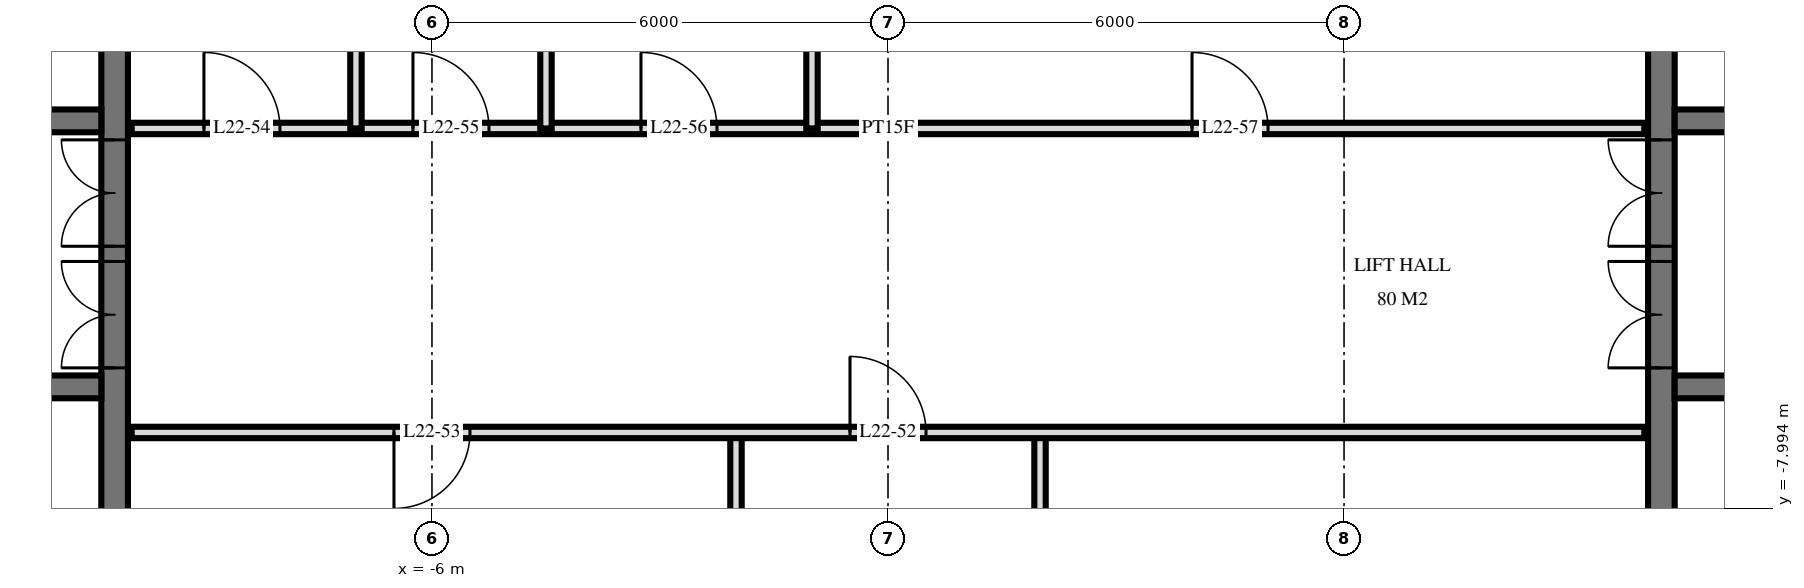
"""IFC4 building model, lengths in metres.
Left out: names, types, materials, properties, quantities, classifications, styles, units other than length and angle.
Written with IfcOpenShell. Run it as: python <this file> out.ifc"""

import sys

from ifc_helpers import new_model, si_unit, direction, frame, frame_2d, origin, place, context, subcontext, project, spatial, rectangle, extrude, element, fill, save


model = new_model("IFC4")
c1 = context("Model", 3, precision=1e-05, world=origin(), true_north=direction((0.0, 1.0)))
c2 = subcontext(c1, "Body", "Model", "MODEL_VIEW")
j1 = project(units=[si_unit("LENGTHUNIT", "METRE"), si_unit("PLANEANGLEUNIT", "RADIAN")], contexts=[c1])
p1 = place(None, origin())
s1 = spatial("IfcSite", under=j1, at=p1, CompositionType="ELEMENT")
p2 = place(p1, origin())
s2 = spatial("IfcBuilding", under=s1, at=p2, CompositionType="ELEMENT")
p3 = place(p2, frame((0.0, 0.0, 88.8)))
s3 = spatial("IfcBuildingStorey", under=s2, at=p3, CompositionType="ELEMENT", Elevation=88.8)
p4 = place(p3, frame((-10.175, -14.55, 0.0), z_axis=(0.0, 0.0, 1.0), x_axis=(0.0, 1.0, 0.0)))
e1 = element("IfcWall", 1, at=p4, inside=s3, PredefinedType="SHEAR", context=c2, shape_type="SweptSolid", body=[
    extrude(rectangle(XDim=14.1, YDim=0.35, at=frame_2d((7.05, 0.0))), origin(), (0.0, 0.0, 1.0), 3.6),
])
p5 = place(p4, frame((8.4, 0.0, 0.0)))
e2 = element("IfcOpeningElement", 2, at=p5, cuts=e1, PredefinedType="OPENING", context=c2, shape_type="SweptSolid", body=[
    extrude(rectangle(XDim=1.4, YDim=2.4, at=frame_2d((0.7, 1.2))), frame((0.0, 0.185, 0.0), z_axis=(0.0, -1.0, 0.0), x_axis=(1.0, 0.0, 0.0)), (0.0, 0.0, 1.0), 0.37),
])
p6 = place(p4, frame((10.0, 0.0, 0.0)))
e3 = element("IfcOpeningElement", 3, at=p6, cuts=e1, PredefinedType="OPENING", context=c2, shape_type="SweptSolid", body=[
    extrude(rectangle(XDim=1.4, YDim=2.4, at=frame_2d((0.7, 1.2))), frame((0.0, 0.185, 0.0), z_axis=(0.0, -1.0, 0.0), x_axis=(1.0, 0.0, 0.0)), (0.0, 0.0, 1.0), 0.37),
])
p7 = place(p4, frame((4.0, 0.0, 0.0)))
e4 = element("IfcOpeningElement", 4, at=p7, cuts=e1, PredefinedType="OPENING", context=c2, shape_type="SweptSolid", body=[
    extrude(rectangle(XDim=1.2, YDim=2.1, at=frame_2d((0.6, 1.05))), frame((0.0, 0.185, 0.0), z_axis=(0.0, -1.0, 0.0), x_axis=(1.0, 0.0, 0.0)), (0.0, 0.0, 1.0), 0.37),
])
p8 = place(p3, frame((-29.05, -2.9, 0.0), z_axis=(0.0, 0.0, 1.0), x_axis=(1.0, 0.0, 0.0)))
e5 = element("IfcWall", 5, at=p8, inside=s3, PredefinedType="SHEAR", context=c2, shape_type="SweptSolid", body=[
    extrude(rectangle(XDim=18.7, YDim=0.3, at=frame_2d((9.35, 0.0))), origin(), (0.0, 0.0, 1.0), 3.6),
])
p9 = place(p8, frame((2.95, 0.0, 0.0)))
e6 = element("IfcOpeningElement", 6, at=p9, cuts=e5, PredefinedType="OPENING", context=c2, shape_type="SweptSolid", body=[
    extrude(rectangle(XDim=1.1, YDim=2.1, at=frame_2d((0.55, 1.05))), frame((0.0, 0.16, 0.0), z_axis=(0.0, -1.0, 0.0), x_axis=(1.0, 0.0, 0.0)), (0.0, 0.0, 1.0), 0.32),
])
p10 = place(p8, frame((0.55, 0.0, 0.0)))
e7 = element("IfcOpeningElement", 7, at=p10, cuts=e5, PredefinedType="OPENING", context=c2, shape_type="SweptSolid", body=[
    extrude(rectangle(XDim=1.1, YDim=2.1, at=frame_2d((0.55, 1.05))), frame((0.0, 0.16, 0.0), z_axis=(0.0, -1.0, 0.0), x_axis=(1.0, 0.0, 0.0)), (0.0, 0.0, 1.0), 0.32),
])
p11 = place(p8, frame((10.9, 0.0, 0.0)))
e8 = element("IfcOpeningElement", 8, at=p11, cuts=e5, PredefinedType="OPENING", context=c2, shape_type="SweptSolid", body=[
    extrude(rectangle(XDim=0.9, YDim=2.1, at=frame_2d((0.45, 1.05))), frame((0.0, 0.16, 0.0), z_axis=(0.0, -1.0, 0.0), x_axis=(1.0, 0.0, 0.0)), (0.0, 0.0, 1.0), 0.32),
])
p12 = place(p8, frame((16.85, 0.0, 0.0)))
e9 = element("IfcOpeningElement", 9, at=p12, cuts=e5, PredefinedType="OPENING", context=c2, shape_type="SweptSolid", body=[
    extrude(rectangle(XDim=1.0, YDim=2.1, at=frame_2d((0.5, 1.05))), frame((0.0, 0.16, 0.0), z_axis=(0.0, -1.0, 0.0), x_axis=(1.0, 0.0, 0.0)), (0.0, 0.0, 1.0), 0.32),
])
p13 = place(p8, frame((14.312, 0.0, 0.0)))
e10 = element("IfcOpeningElement", 10, at=p13, cuts=e5, PredefinedType="OPENING", context=c2, shape_type="SweptSolid", body=[
    extrude(rectangle(XDim=1.0, YDim=2.1, at=frame_2d((0.5, 1.05))), frame((0.0, 0.16, 0.0), z_axis=(0.0, -1.0, 0.0), x_axis=(1.0, 0.0, 0.0)), (0.0, 0.0, 1.0), 0.32),
])
p14 = place(p8, frame((12.887, 0.0, 0.0)))
e11 = element("IfcOpeningElement", 11, at=p14, cuts=e5, PredefinedType="OPENING", context=c2, shape_type="SweptSolid", body=[
    extrude(rectangle(XDim=1.0, YDim=2.1, at=frame_2d((0.5, 1.05))), frame((0.0, 0.16, 0.0), z_axis=(0.0, -1.0, 0.0), x_axis=(1.0, 0.0, 0.0)), (0.0, 0.0, 1.0), 0.32),
])
p15 = place(p8, frame((5.6, 0.0, 0.0)))
e12 = element("IfcOpeningElement", 12, at=p15, cuts=e5, PredefinedType="OPENING", context=c2, shape_type="SweptSolid", body=[
    extrude(rectangle(XDim=1.0, YDim=2.1, at=frame_2d((0.5, 1.05))), frame((0.0, 0.16, 0.0), z_axis=(0.0, -1.0, 0.0), x_axis=(1.0, 0.0, 0.0)), (0.0, 0.0, 1.0), 0.32),
])
p16 = place(p3, frame((-29.05, -6.4, 0.0), z_axis=(0.0, 0.0, 1.0), x_axis=(1.0, 0.0, 0.0)))
e13 = element("IfcWall", 13, at=p16, inside=s3, PredefinedType="SHEAR", context=c2, shape_type="SweptSolid", body=[
    extrude(rectangle(XDim=18.7, YDim=0.3, at=frame_2d((9.35, 0.0))), origin(), (0.0, 0.0, 1.0), 3.6),
])
p17 = place(p16, frame((2.95, 0.0, 0.0)))
e14 = element("IfcOpeningElement", 14, at=p17, cuts=e13, PredefinedType="OPENING", context=c2, shape_type="SweptSolid", body=[
    extrude(rectangle(XDim=1.1, YDim=2.1, at=frame_2d((0.55, 1.05))), frame((0.0, 0.16, 0.0), z_axis=(0.0, -1.0, 0.0), x_axis=(1.0, 0.0, 0.0)), (0.0, 0.0, 1.0), 0.32),
])
p18 = place(p16, frame((0.55, 0.0, 0.0)))
e15 = element("IfcOpeningElement", 15, at=p18, cuts=e13, PredefinedType="OPENING", context=c2, shape_type="SweptSolid", body=[
    extrude(rectangle(XDim=1.1, YDim=2.1, at=frame_2d((0.55, 1.05))), frame((0.0, 0.16, 0.0), z_axis=(0.0, -1.0, 0.0), x_axis=(1.0, 0.0, 0.0)), (0.0, 0.0, 1.0), 0.32),
])
p19 = place(p16, frame((10.8, 0.0, 0.0)))
e16 = element("IfcOpeningElement", 16, at=p19, cuts=e13, PredefinedType="OPENING", context=c2, shape_type="SweptSolid", body=[
    extrude(rectangle(XDim=1.1, YDim=2.1, at=frame_2d((0.55, 1.05))), frame((0.0, 0.16, 0.0), z_axis=(0.0, -1.0, 0.0), x_axis=(1.0, 0.0, 0.0)), (0.0, 0.0, 1.0), 0.32),
])
p20 = place(p16, frame((5.6, 0.0, 0.0)))
e17 = element("IfcOpeningElement", 17, at=p20, cuts=e13, PredefinedType="OPENING", context=c2, shape_type="SweptSolid", body=[
    extrude(rectangle(XDim=1.0, YDim=2.1, at=frame_2d((0.5, 1.05))), frame((0.0, 0.16, 0.0), z_axis=(0.0, -1.0, 0.0), x_axis=(1.0, 0.0, 0.0)), (0.0, 0.0, 1.0), 0.32),
])
p21 = place(p3, frame((10.175, -14.55, 0.0), z_axis=(0.0, 0.0, 1.0), x_axis=(0.0, 1.0, 0.0)))
e18 = element("IfcWall", 18, at=p21, inside=s3, PredefinedType="SHEAR", context=c2, shape_type="SweptSolid", body=[
    extrude(rectangle(XDim=14.1, YDim=0.35, at=frame_2d((7.05, 0.0))), origin(), (0.0, 0.0, 1.0), 3.6),
])
p22 = place(p21, frame((8.4, 0.0, 0.0)))
e19 = element("IfcOpeningElement", 19, at=p22, cuts=e18, PredefinedType="OPENING", context=c2, shape_type="SweptSolid", body=[
    extrude(rectangle(XDim=1.4, YDim=2.4, at=frame_2d((0.7, 1.2))), frame((0.0, 0.185, 0.0), z_axis=(0.0, -1.0, 0.0), x_axis=(1.0, 0.0, 0.0)), (0.0, 0.0, 1.0), 0.37),
])
p23 = place(p21, frame((10.0, 0.0, 0.0)))
e20 = element("IfcOpeningElement", 20, at=p23, cuts=e18, PredefinedType="OPENING", context=c2, shape_type="SweptSolid", body=[
    extrude(rectangle(XDim=1.4, YDim=2.4, at=frame_2d((0.7, 1.2))), frame((0.0, 0.185, 0.0), z_axis=(0.0, -1.0, 0.0), x_axis=(1.0, 0.0, 0.0)), (0.0, 0.0, 1.0), 0.37),
])
p24 = place(p21, frame((4.0, 0.0, 0.0)))
e21 = element("IfcOpeningElement", 21, at=p24, cuts=e18, PredefinedType="OPENING", context=c2, shape_type="SweptSolid", body=[
    extrude(rectangle(XDim=1.2, YDim=2.1, at=frame_2d((0.6, 1.05))), frame((0.0, 0.185, 0.0), z_axis=(0.0, -1.0, 0.0), x_axis=(1.0, 0.0, 0.0)), (0.0, 0.0, 1.0), 0.37),
])
p25 = place(p3, frame((10.35, -2.9, 0.0), z_axis=(0.0, 0.0, 1.0), x_axis=(1.0, 0.0, 0.0)))
e22 = element("IfcWall", 22, at=p25, inside=s3, PredefinedType="SHEAR", context=c2, shape_type="SweptSolid", body=[
    extrude(rectangle(XDim=18.7, YDim=0.3, at=frame_2d((9.35, 0.0))), origin(), (0.0, 0.0, 1.0), 3.6),
])
p26 = place(p25, frame((14.65, 0.0, 0.0)))
e23 = element("IfcOpeningElement", 23, at=p26, cuts=e22, PredefinedType="OPENING", context=c2, shape_type="SweptSolid", body=[
    extrude(rectangle(XDim=1.1, YDim=2.1, at=frame_2d((0.55, 1.05))), frame((0.0, 0.16, 0.0), z_axis=(0.0, -1.0, 0.0), x_axis=(1.0, 0.0, 0.0)), (0.0, 0.0, 1.0), 0.32),
])
p27 = place(p25, frame((17.05, 0.0, 0.0)))
e24 = element("IfcOpeningElement", 24, at=p27, cuts=e22, PredefinedType="OPENING", context=c2, shape_type="SweptSolid", body=[
    extrude(rectangle(XDim=1.1, YDim=2.1, at=frame_2d((0.55, 1.05))), frame((0.0, 0.16, 0.0), z_axis=(0.0, -1.0, 0.0), x_axis=(1.0, 0.0, 0.0)), (0.0, 0.0, 1.0), 0.32),
])
p28 = place(p25, frame((6.9, 0.0, 0.0)))
e25 = element("IfcOpeningElement", 25, at=p28, cuts=e22, PredefinedType="OPENING", context=c2, shape_type="SweptSolid", body=[
    extrude(rectangle(XDim=0.9, YDim=2.1, at=frame_2d((0.45, 1.05))), frame((0.0, 0.16, 0.0), z_axis=(0.0, -1.0, 0.0), x_axis=(1.0, 0.0, 0.0)), (0.0, 0.0, 1.0), 0.32),
])
p29 = place(p25, frame((0.85, 0.0, 0.0)))
e26 = element("IfcOpeningElement", 26, at=p29, cuts=e22, PredefinedType="OPENING", context=c2, shape_type="SweptSolid", body=[
    extrude(rectangle(XDim=1.0, YDim=2.1, at=frame_2d((0.5, 1.05))), frame((0.0, 0.16, 0.0), z_axis=(0.0, -1.0, 0.0), x_axis=(1.0, 0.0, 0.0)), (0.0, 0.0, 1.0), 0.32),
])
p30 = place(p25, frame((3.387, 0.0, 0.0)))
e27 = element("IfcOpeningElement", 27, at=p30, cuts=e22, PredefinedType="OPENING", context=c2, shape_type="SweptSolid", body=[
    extrude(rectangle(XDim=1.0, YDim=2.1, at=frame_2d((0.5, 1.05))), frame((0.0, 0.16, 0.0), z_axis=(0.0, -1.0, 0.0), x_axis=(1.0, 0.0, 0.0)), (0.0, 0.0, 1.0), 0.32),
])
p31 = place(p25, frame((4.812, 0.0, 0.0)))
e28 = element("IfcOpeningElement", 28, at=p31, cuts=e22, PredefinedType="OPENING", context=c2, shape_type="SweptSolid", body=[
    extrude(rectangle(XDim=1.0, YDim=2.1, at=frame_2d((0.5, 1.05))), frame((0.0, 0.16, 0.0), z_axis=(0.0, -1.0, 0.0), x_axis=(1.0, 0.0, 0.0)), (0.0, 0.0, 1.0), 0.32),
])
p32 = place(p25, frame((12.1, 0.0, 0.0)))
e29 = element("IfcOpeningElement", 29, at=p32, cuts=e22, PredefinedType="OPENING", context=c2, shape_type="SweptSolid", body=[
    extrude(rectangle(XDim=1.0, YDim=2.1, at=frame_2d((0.5, 1.05))), frame((0.0, 0.16, 0.0), z_axis=(0.0, -1.0, 0.0), x_axis=(1.0, 0.0, 0.0)), (0.0, 0.0, 1.0), 0.32),
])
p33 = place(p3, frame((10.35, -6.4, 0.0), z_axis=(0.0, 0.0, 1.0), x_axis=(1.0, 0.0, 0.0)))
e30 = element("IfcWall", 30, at=p33, inside=s3, PredefinedType="SHEAR", context=c2, shape_type="SweptSolid", body=[
    extrude(rectangle(XDim=18.7, YDim=0.3, at=frame_2d((9.35, 0.0))), origin(), (0.0, 0.0, 1.0), 3.6),
])
p34 = place(p33, frame((14.65, 0.0, 0.0)))
e31 = element("IfcOpeningElement", 31, at=p34, cuts=e30, PredefinedType="OPENING", context=c2, shape_type="SweptSolid", body=[
    extrude(rectangle(XDim=1.1, YDim=2.1, at=frame_2d((0.55, 1.05))), frame((0.0, 0.16, 0.0), z_axis=(0.0, -1.0, 0.0), x_axis=(1.0, 0.0, 0.0)), (0.0, 0.0, 1.0), 0.32),
])
p35 = place(p33, frame((17.05, 0.0, 0.0)))
e32 = element("IfcOpeningElement", 32, at=p35, cuts=e30, PredefinedType="OPENING", context=c2, shape_type="SweptSolid", body=[
    extrude(rectangle(XDim=1.1, YDim=2.1, at=frame_2d((0.55, 1.05))), frame((0.0, 0.16, 0.0), z_axis=(0.0, -1.0, 0.0), x_axis=(1.0, 0.0, 0.0)), (0.0, 0.0, 1.0), 0.32),
])
p36 = place(p33, frame((6.8, 0.0, 0.0)))
e33 = element("IfcOpeningElement", 33, at=p36, cuts=e30, PredefinedType="OPENING", context=c2, shape_type="SweptSolid", body=[
    extrude(rectangle(XDim=1.1, YDim=2.1, at=frame_2d((0.55, 1.05))), frame((0.0, 0.16, 0.0), z_axis=(0.0, -1.0, 0.0), x_axis=(1.0, 0.0, 0.0)), (0.0, 0.0, 1.0), 0.32),
])
p37 = place(p33, frame((12.1, 0.0, 0.0)))
e34 = element("IfcOpeningElement", 34, at=p37, cuts=e30, PredefinedType="OPENING", context=c2, shape_type="SweptSolid", body=[
    extrude(rectangle(XDim=1.0, YDim=2.1, at=frame_2d((0.5, 1.05))), frame((0.0, 0.16, 0.0), z_axis=(0.0, -1.0, 0.0), x_axis=(1.0, 0.0, 0.0)), (0.0, 0.0, 1.0), 0.32),
])
p38 = place(p3, frame((2.0, -11.0, 0.0), z_axis=(0.0, 0.0, 1.0), x_axis=(0.0, 1.0, 0.0)))
e35 = element("IfcWall", 35, at=p38, inside=s3, PredefinedType="PARTITIONING", context=c2, shape_type="SweptSolid", body=[
    extrude(rectangle(XDim=4.0, YDim=0.15, at=frame_2d((2.0, 0.0))), origin(), (0.0, 0.0, 1.0), 3.32),
])
p39 = place(p3, frame((-1.0, -3.0, 0.0), z_axis=(0.0, 0.0, 1.0), x_axis=(0.0, 1.0, 0.0)))
e36 = element("IfcWall", 36, at=p39, inside=s3, PredefinedType="PARTITIONING", context=c2, shape_type="SweptSolid", body=[
    extrude(rectangle(XDim=4.02, YDim=0.15, at=frame_2d((2.01, 0.0))), origin(), (0.0, 0.0, 1.0), 3.32),
])
p40 = place(p3, frame((-2.0, -11.0, 0.0), z_axis=(0.0, 0.0, 1.0), x_axis=(0.0, 1.0, 0.0)))
e37 = element("IfcWall", 37, at=p40, inside=s3, PredefinedType="PARTITIONING", context=c2, shape_type="SweptSolid", body=[
    extrude(rectangle(XDim=4.0, YDim=0.15, at=frame_2d((2.0, 0.0))), origin(), (0.0, 0.0, 1.0), 3.32),
])
for number, where, z_axis, x_axis in (
    (38, (-4.5, -3.0, 0.0), (0.0, 0.0, 1.0), (0.0, 1.0, 0.0)),
    (39, (-7.0, -3.0, 0.0), (0.0, 0.0, 1.0), (0.0, 1.0, 0.0)),
):
    element("IfcWall", number, at=place(p3, frame(where, z_axis=z_axis, x_axis=x_axis)), inside=s3, PredefinedType="PLUMBINGWALL", context=c2, shape_type="SweptSolid", body=[
        extrude(rectangle(XDim=4.02, YDim=0.15, at=frame_2d((2.01, 0.0))), origin(), (0.0, 0.0, 1.0), 3.32),
    ])
p41 = place(p3, frame((-9.95, -7.0, 0.0), z_axis=(0.0, 0.0, 1.0), x_axis=(1.0, 0.0, 0.0)))
e40 = element("IfcWall", 40, at=p41, inside=s3, PredefinedType="PARTITIONING", context=c2, shape_type="SweptSolid", body=[
    extrude(rectangle(XDim=19.9, YDim=0.15, at=frame_2d((9.95, 0.0))), origin(), (0.0, 0.0, 1.0), 3.32),
])
p42 = place(p41, frame((9.45, 0.0, 0.0)))
e41 = element("IfcOpeningElement", 41, at=p42, cuts=e40, PredefinedType="OPENING", context=c2, shape_type="SweptSolid", body=[
    extrude(rectangle(XDim=1.0, YDim=2.1, at=frame_2d((0.5, 1.05))), frame((0.0, 0.085, 0.0), z_axis=(0.0, -1.0, 0.0), x_axis=(1.0, 0.0, 0.0)), (0.0, 0.0, 1.0), 0.17),
])
p43 = place(p41, frame((3.45, 0.0, 0.0)))
e42 = element("IfcOpeningElement", 42, at=p43, cuts=e40, PredefinedType="OPENING", context=c2, shape_type="SweptSolid", body=[
    extrude(rectangle(XDim=1.0, YDim=2.1, at=frame_2d((0.5, 1.05))), frame((0.0, 0.085, 0.0), z_axis=(0.0, -1.0, 0.0), x_axis=(1.0, 0.0, 0.0)), (0.0, 0.0, 1.0), 0.17),
])
p44 = place(p3, frame((-9.95, -3.0, 0.0), z_axis=(0.0, 0.0, 1.0), x_axis=(1.0, 0.0, 0.0)))
e43 = element("IfcWall", 43, at=p44, inside=s3, PredefinedType="PARTITIONING", context=c2, shape_type="SweptSolid", body=[
    extrude(rectangle(XDim=19.9, YDim=0.15, at=frame_2d((9.95, 0.0))), origin(), (0.0, 0.0, 1.0), 3.32),
])
p45 = place(p44, frame((0.95, 0.0, 0.0)))
e44 = element("IfcOpeningElement", 44, at=p45, cuts=e43, PredefinedType="OPENING", context=c2, shape_type="SweptSolid", body=[
    extrude(rectangle(XDim=1.0, YDim=2.1, at=frame_2d((0.5, 1.05))), frame((0.0, 0.085, 0.0), z_axis=(0.0, -1.0, 0.0), x_axis=(1.0, 0.0, 0.0)), (0.0, 0.0, 1.0), 0.17),
])
p46 = place(p44, frame((3.7, 0.0, 0.0)))
e45 = element("IfcOpeningElement", 45, at=p46, cuts=e43, PredefinedType="OPENING", context=c2, shape_type="SweptSolid", body=[
    extrude(rectangle(XDim=1.0, YDim=2.1, at=frame_2d((0.5, 1.05))), frame((0.0, 0.085, 0.0), z_axis=(0.0, -1.0, 0.0), x_axis=(1.0, 0.0, 0.0)), (0.0, 0.0, 1.0), 0.17),
])
p47 = place(p44, frame((6.7, 0.0, 0.0)))
e46 = element("IfcOpeningElement", 46, at=p47, cuts=e43, PredefinedType="OPENING", context=c2, shape_type="SweptSolid", body=[
    extrude(rectangle(XDim=1.0, YDim=2.1, at=frame_2d((0.5, 1.05))), frame((0.0, 0.085, 0.0), z_axis=(0.0, -1.0, 0.0), x_axis=(1.0, 0.0, 0.0)), (0.0, 0.0, 1.0), 0.17),
])
p48 = place(p44, frame((13.95, 0.0, 0.0)))
e47 = element("IfcOpeningElement", 47, at=p48, cuts=e43, PredefinedType="OPENING", context=c2, shape_type="SweptSolid", body=[
    extrude(rectangle(XDim=1.0, YDim=2.1, at=frame_2d((0.5, 1.05))), frame((0.0, 0.085, 0.0), z_axis=(0.0, -1.0, 0.0), x_axis=(1.0, 0.0, 0.0)), (0.0, 0.0, 1.0), 0.17),
])
p49 = place(p5, origin())
e48 = element("IfcDoor", 48, at=p49, inside=s3, OperationType="DOUBLE_DOOR_SINGLE_SWING", PredefinedType="DOOR", context=c2, shape_type="SweptSolid", body=[
    extrude(rectangle(XDim=1.4, YDim=2.4, at=frame_2d((0.7, 1.2))), frame((0.0, 0.025, 0.0), z_axis=(0.0, -1.0, 0.0), x_axis=(1.0, 0.0, 0.0)), (0.0, 0.0, 1.0), 0.05),
])
fill(e2, e48)
p50 = place(p6, origin())
e49 = element("IfcDoor", 49, at=p50, inside=s3, OperationType="DOUBLE_DOOR_SINGLE_SWING", PredefinedType="DOOR", context=c2, shape_type="SweptSolid", body=[
    extrude(rectangle(XDim=1.4, YDim=2.4, at=frame_2d((0.7, 1.2))), frame((0.0, 0.025, 0.0), z_axis=(0.0, -1.0, 0.0), x_axis=(1.0, 0.0, 0.0)), (0.0, 0.0, 1.0), 0.05),
])
fill(e3, e49)
p51 = place(p22, origin())
e50 = element("IfcDoor", 50, at=p51, inside=s3, OperationType="DOUBLE_DOOR_SINGLE_SWING", PredefinedType="DOOR", context=c2, shape_type="SweptSolid", body=[
    extrude(rectangle(XDim=1.4, YDim=2.4, at=frame_2d((0.7, 1.2))), frame((0.0, 0.025, 0.0), z_axis=(0.0, -1.0, 0.0), x_axis=(1.0, 0.0, 0.0)), (0.0, 0.0, 1.0), 0.05),
])
fill(e19, e50)
p52 = place(p23, origin())
e51 = element("IfcDoor", 51, at=p52, inside=s3, OperationType="DOUBLE_DOOR_SINGLE_SWING", PredefinedType="DOOR", context=c2, shape_type="SweptSolid", body=[
    extrude(rectangle(XDim=1.4, YDim=2.4, at=frame_2d((0.7, 1.2))), frame((0.0, 0.025, 0.0), z_axis=(0.0, -1.0, 0.0), x_axis=(1.0, 0.0, 0.0)), (0.0, 0.0, 1.0), 0.05),
])
fill(e20, e51)
p53 = place(p42, origin())
e52 = element("IfcDoor", 52, at=p53, inside=s3, OperationType="SINGLE_SWING_RIGHT", PredefinedType="DOOR", context=c2, shape_type="SweptSolid", body=[
    extrude(rectangle(XDim=1.0, YDim=2.1, at=frame_2d((0.5, 1.05))), frame((0.0, 0.025, 0.0), z_axis=(0.0, -1.0, 0.0), x_axis=(1.0, 0.0, 0.0)), (0.0, 0.0, 1.0), 0.05),
])
fill(e41, e52)
p54 = place(p43, frame((0.5, 0.0, 0.0), z_axis=(0.0, 0.0, 1.0), x_axis=(-1.0, 0.0, 0.0)))
e53 = element("IfcDoor", 53, at=p54, inside=s3, OperationType="SINGLE_SWING_LEFT", PredefinedType="DOOR", context=c2, shape_type="SweptSolid", body=[
    extrude(rectangle(XDim=1.0, YDim=2.1, at=frame_2d((0.0, 1.05))), frame((0.0, -0.025, 0.0), z_axis=(0.0, 1.0, 0.0), x_axis=(-1.0, 0.0, 0.0)), (0.0, 0.0, 1.0), 0.05),
])
fill(e42, e53)
p55 = place(p45, origin())
e54 = element("IfcDoor", 54, at=p55, inside=s3, OperationType="SINGLE_SWING_RIGHT", PredefinedType="DOOR", context=c2, shape_type="SweptSolid", body=[
    extrude(rectangle(XDim=1.0, YDim=2.1, at=frame_2d((0.5, 1.05))), frame((0.0, 0.025, 0.0), z_axis=(0.0, -1.0, 0.0), x_axis=(1.0, 0.0, 0.0)), (0.0, 0.0, 1.0), 0.05),
])
fill(e44, e54)
p56 = place(p46, origin())
e55 = element("IfcDoor", 55, at=p56, inside=s3, OperationType="SINGLE_SWING_RIGHT", PredefinedType="DOOR", context=c2, shape_type="SweptSolid", body=[
    extrude(rectangle(XDim=1.0, YDim=2.1, at=frame_2d((0.5, 1.05))), frame((0.0, 0.025, 0.0), z_axis=(0.0, -1.0, 0.0), x_axis=(1.0, 0.0, 0.0)), (0.0, 0.0, 1.0), 0.05),
])
fill(e45, e55)
p57 = place(p47, origin())
e56 = element("IfcDoor", 56, at=p57, inside=s3, OperationType="SINGLE_SWING_RIGHT", PredefinedType="DOOR", context=c2, shape_type="SweptSolid", body=[
    extrude(rectangle(XDim=1.0, YDim=2.1, at=frame_2d((0.5, 1.05))), frame((0.0, 0.025, 0.0), z_axis=(0.0, -1.0, 0.0), x_axis=(1.0, 0.0, 0.0)), (0.0, 0.0, 1.0), 0.05),
])
fill(e46, e56)
p58 = place(p48, origin())
e57 = element("IfcDoor", 57, at=p58, inside=s3, OperationType="SINGLE_SWING_RIGHT", PredefinedType="DOOR", context=c2, shape_type="SweptSolid", body=[
    extrude(rectangle(XDim=1.0, YDim=2.1, at=frame_2d((0.5, 1.05))), frame((0.0, 0.025, 0.0), z_axis=(0.0, -1.0, 0.0), x_axis=(1.0, 0.0, 0.0)), (0.0, 0.0, 1.0), 0.05),
])
fill(e47, e57)
save(model, sys.argv[1])
